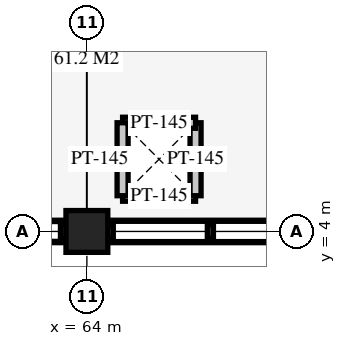
"""IFC4 building model, lengths in metres.
Left out: names, types, materials, properties, quantities, classifications, styles, units other than length and angle.
Written with IfcOpenShell. Run it as: python <this file> out.ifc"""

import sys

from ifc_helpers import new_model, si_unit, direction, frame, frame_2d, origin, origin_2d, place, context, subcontext, project, spatial, rectangle, extrude, element, save


model = new_model("IFC4")
c1 = context("Model", 3, precision=1e-05, world=origin(), true_north=direction((0.0, 1.0)))
c2 = subcontext(c1, "Body", "Model", "MODEL_VIEW")
j1 = project(units=[si_unit("LENGTHUNIT", "METRE"), si_unit("PLANEANGLEUNIT", "RADIAN")], contexts=[c1])
p1 = place(None, origin())
s1 = spatial("IfcSite", under=j1, at=p1, CompositionType="ELEMENT")
p2 = place(p1, origin())
s2 = spatial("IfcBuilding", under=s1, at=p2, CompositionType="ELEMENT")
p3 = place(p2, frame((0.0, 0.0, 4.5)))
s3 = spatial("IfcBuildingStorey", under=s2, at=p3, CompositionType="ELEMENT", Elevation=4.5)
p4 = place(p3, frame((64.0, 4.0, 0.0), z_axis=(0.0, 0.0, 1.0), x_axis=(1.0, 0.0, 0.0)))
e1 = element("IfcColumn", 1, at=p4, inside=s3, PredefinedType="COLUMN", context=c2, shape_type="SweptSolid", body=[
    extrude(rectangle(XDim=0.55, YDim=0.55, at=origin_2d()), origin(), (0.0, 0.0, 1.0), 4.5),
])
p5 = place(p3, frame((63.725, 4.0, 0.0), z_axis=(0.0, 0.0, 1.0), x_axis=(-1.0, 0.0, 0.0)))
e2 = element("IfcWall", 2, at=p5, inside=s3, PredefinedType="SOLIDWALL", context=c2, shape_type="SweptSolid", body=[
    extrude(rectangle(XDim=5.4, YDim=0.295, at=frame_2d((2.7, 0.0))), origin(), (0.0, 0.0, 1.0), 0.31),
])
p6 = place(p3, frame((69.675, 4.0, 0.0), z_axis=(0.0, 0.0, 1.0), x_axis=(-1.0, 0.0, 0.0)))
e3 = element("IfcWall", 3, at=p6, inside=s3, PredefinedType="SOLIDWALL", context=c2, shape_type="SweptSolid", body=[
    extrude(rectangle(XDim=5.4, YDim=0.295, at=frame_2d((2.7, 0.0))), origin(), (0.0, 0.0, 1.0), 0.36),
])
for number, where, z_axis, x_axis in (
    (4, (64.47, 4.47, 0.0), (0.0, 0.0, 1.0), (1.0, 0.0, 0.0)),
    (5, (65.43, 4.47, 0.0), (0.0, 0.0, 1.0), (0.0, 1.0, 0.0)),
    (6, (65.43, 5.43, 0.0), (0.0, 0.0, 1.0), (-1.0, 0.0, 0.0)),
    (7, (64.47, 5.43, 0.0), (0.0, 0.0, 1.0), (0.0, -1.0, 0.0)),
):
    element("IfcWall", number, at=place(p3, frame(where, z_axis=z_axis, x_axis=x_axis)), inside=s3, PredefinedType="PARTITIONING", context=c2, shape_type="SweptSolid", body=[
        extrude(rectangle(XDim=0.96, YDim=0.145, at=frame_2d((0.48, 0.0))), origin(), (0.0, 0.0, 1.0), 4.264),
    ])
save(model, sys.argv[1])
